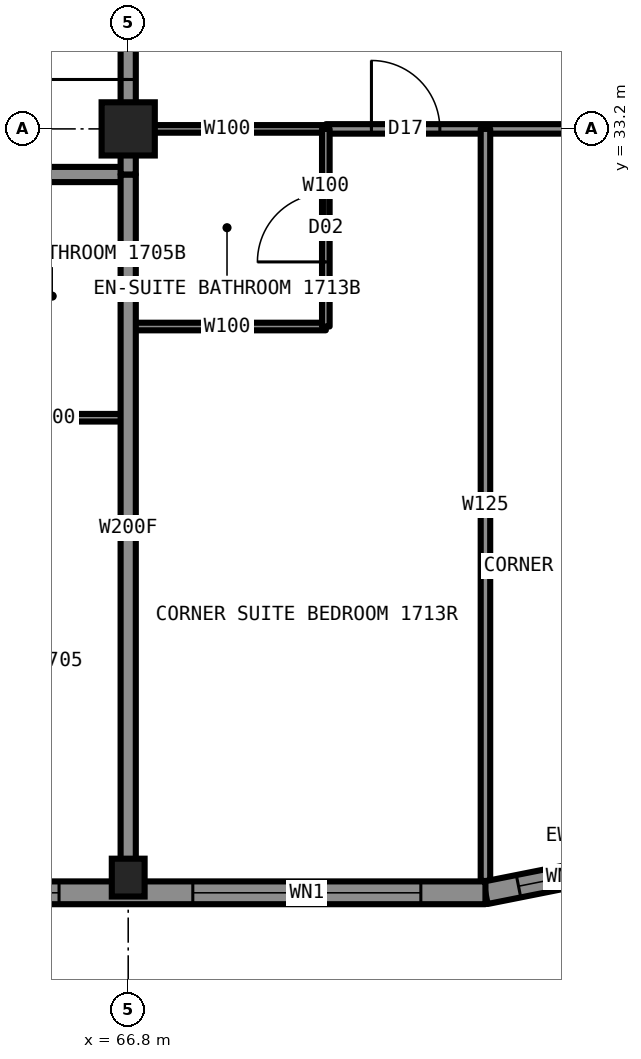
"""IFC4 building model, lengths in metres.
Left out: names, types, materials, properties, quantities, classifications, styles, units other than length and angle.
Written with IfcOpenShell. Run it as: python <this file> out.ifc"""

import sys

from ifc_helpers import new_model, si_unit, direction, frame, frame_2d, origin, origin_2d, place, context, subcontext, project, spatial, rectangle, hollow_rectangle, i_section, extrude, element, fill, save


model = new_model("IFC4")
c1 = context("Model", 3, precision=1e-05, world=origin(), true_north=direction((0.0, 1.0)))
c2 = subcontext(c1, "Body", "Model", "MODEL_VIEW")
j1 = project(units=[si_unit("LENGTHUNIT", "METRE"), si_unit("PLANEANGLEUNIT", "RADIAN")], contexts=[c1])
p1 = place(None, origin())
s1 = spatial("IfcSite", under=j1, at=p1, CompositionType="ELEMENT")
p2 = place(p1, origin())
s2 = spatial("IfcBuilding", under=s1, at=p2, CompositionType="ELEMENT")
p3 = place(p2, frame((0.0, 0.0, 60.0)))
s3 = spatial("IfcBuildingStorey", under=s2, at=p3, CompositionType="ELEMENT", Elevation=60.0)
p4 = place(p3, frame((66.8, 23.35, 0.0), z_axis=(0.0, 0.0, 1.0), x_axis=(1.0, 0.0, 0.0)))
e1 = element("IfcColumn", 1, at=p4, inside=s3, PredefinedType="COLUMN", context=c2, shape_type="SweptSolid", body=[
    extrude(i_section(OverallWidth=0.432, OverallDepth=0.498, WebThickness=0.056, FlangeThickness=0.089, at=origin_2d()), origin(), (0.0, 0.0, 1.0), 3.5),
])
p5 = place(p3, frame((66.8, 33.2, 0.0), z_axis=(0.0, 0.0, 1.0), x_axis=(1.0, 0.0, 0.0)))
e2 = element("IfcColumn", 2, at=p5, inside=s3, PredefinedType="COLUMN", context=c2, shape_type="SweptSolid", body=[
    extrude(hollow_rectangle(XDim=0.7, YDim=0.7, WallThickness=0.06, at=origin_2d()), origin(), (0.0, 0.0, 1.0), 3.5),
])
p6 = place(p3, frame((66.8, 33.2, 0.0), z_axis=(0.0, 0.0, 1.0), x_axis=(1.0, 0.0, 0.0)))
e3 = element("IfcWall", 3, at=p6, inside=s3, PredefinedType="PARTITIONING", context=c2, shape_type="SweptSolid", body=[
    extrude(rectangle(XDim=2.6, YDim=0.1, at=frame_2d((1.3, 0.0))), origin(), (0.0, 0.0, 1.0), 2.573),
])
p7 = place(p3, frame((69.4, 33.2, 0.0), z_axis=(0.0, 0.0, 1.0), x_axis=(1.0, 0.0, 0.0)))
e4 = element("IfcWall", 4, at=p7, inside=s3, PredefinedType="PARTITIONING", context=c2, shape_type="SweptSolid", body=[
    extrude(rectangle(XDim=7.3, YDim=0.125, at=frame_2d((3.65, 0.0))), origin(), (0.0, 0.0, 1.0), 2.573),
])
p8 = place(p7, frame((0.6, 0.0, 0.0)))
e5 = element("IfcOpeningElement", 5, at=p8, cuts=e4, PredefinedType="OPENING", context=c2, shape_type="SweptSolid", body=[
    extrude(rectangle(XDim=0.9, YDim=2.2, at=frame_2d((0.45, 1.1))), frame((0.0, 0.073, 0.0), z_axis=(0.0, -1.0, 0.0), x_axis=(1.0, 0.0, 0.0)), (0.0, 0.0, 1.0), 0.145),
])
p9 = place(p7, frame((4.4, 0.0, 0.0)))
e6 = element("IfcOpeningElement", 6, at=p9, cuts=e4, PredefinedType="OPENING", context=c2, shape_type="SweptSolid", body=[
    extrude(rectangle(XDim=0.9, YDim=2.2, at=frame_2d((0.45, 1.1))), frame((0.0, 0.073, 0.0), z_axis=(0.0, -1.0, 0.0), x_axis=(1.0, 0.0, 0.0)), (0.0, 0.0, 1.0), 0.145),
])
p10 = place(p3, frame((43.2, 32.6, 0.0), z_axis=(0.0, 0.0, 1.0), x_axis=(1.0, 0.0, 0.0)))
e7 = element("IfcWall", 7, at=p10, inside=s3, PredefinedType="PARTITIONING", context=c2, shape_type="SweptSolid", body=[
    extrude(rectangle(XDim=23.6, YDim=0.2, at=frame_2d((11.8, 0.0))), origin(), (0.0, 0.0, 1.0), 3.33),
])
p11 = place(p10, frame((3.0, 0.0, 0.0)))
e8 = element("IfcOpeningElement", 8, at=p11, cuts=e7, PredefinedType="OPENING", context=c2, shape_type="SweptSolid", body=[
    extrude(rectangle(XDim=1.0, YDim=2.2, at=frame_2d((0.5, 1.1))), frame((0.0, 0.11, 0.0), z_axis=(0.0, -1.0, 0.0), x_axis=(1.0, 0.0, 0.0)), (0.0, 0.0, 1.0), 0.22),
])
p12 = place(p10, frame((12.44, 0.0, 0.0)))
e9 = element("IfcOpeningElement", 9, at=p12, cuts=e7, PredefinedType="OPENING", context=c2, shape_type="SweptSolid", body=[
    extrude(rectangle(XDim=1.0, YDim=2.2, at=frame_2d((0.5, 1.1))), frame((0.0, 0.11, 0.0), z_axis=(0.0, -1.0, 0.0), x_axis=(1.0, 0.0, 0.0)), (0.0, 0.0, 1.0), 0.22),
])
p13 = place(p10, frame((20.34, 0.0, 0.0)))
e10 = element("IfcOpeningElement", 10, at=p13, cuts=e7, PredefinedType="OPENING", context=c2, shape_type="SweptSolid", body=[
    extrude(rectangle(XDim=1.0, YDim=2.2, at=frame_2d((0.5, 1.1))), frame((0.0, 0.11, 0.0), z_axis=(0.0, -1.0, 0.0), x_axis=(1.0, 0.0, 0.0)), (0.0, 0.0, 1.0), 0.22),
])
p14 = place(p3, frame((66.8, 30.6, 0.0), z_axis=(0.0, 0.0, 1.0), x_axis=(1.0, 0.0, 0.0)))
e11 = element("IfcWall", 11, at=p14, inside=s3, PredefinedType="PARTITIONING", context=c2, shape_type="SweptSolid", body=[
    extrude(rectangle(XDim=2.6, YDim=0.1, at=frame_2d((1.3, 0.0))), origin(), (0.0, 0.0, 1.0), 3.33),
])
p15 = place(p3, frame((64.8, 29.4, 0.0), z_axis=(0.0, 0.0, 1.0), x_axis=(1.0, 0.0, 0.0)))
e12 = element("IfcWall", 12, at=p15, inside=s3, PredefinedType="PARTITIONING", context=c2, shape_type="SweptSolid", body=[
    extrude(rectangle(XDim=2.0, YDim=0.1, at=frame_2d((1.0, 0.0))), origin(), (0.0, 0.0, 1.0), 3.33),
])
p16 = place(p3, frame((66.8, 33.22, 0.0), z_axis=(0.0, 0.0, 1.0), x_axis=(0.0, 1.0, 0.0)))
e13 = element("IfcWall", 13, at=p16, inside=s3, PredefinedType="PARTITIONING", context=c2, shape_type="SweptSolid", body=[
    extrude(rectangle(XDim=23.58, YDim=0.2, at=frame_2d((11.79, 0.0))), origin(), (0.0, 0.0, 1.0), 3.33),
])
p17 = place(p16, frame((7.7, 0.0, 0.0)))
e14 = element("IfcOpeningElement", 14, at=p17, cuts=e13, PredefinedType="OPENING", context=c2, shape_type="SweptSolid", body=[
    extrude(rectangle(XDim=1.0, YDim=2.2, at=frame_2d((0.5, 1.1))), frame((0.0, 0.11, 0.0), z_axis=(0.0, -1.0, 0.0), x_axis=(1.0, 0.0, 0.0)), (0.0, 0.0, 1.0), 0.22),
])
p18 = place(p16, frame((17.29, 0.0, 0.0)))
e15 = element("IfcOpeningElement", 15, at=p18, cuts=e13, PredefinedType="OPENING", context=c2, shape_type="SweptSolid", body=[
    extrude(rectangle(XDim=1.0, YDim=2.2, at=frame_2d((0.5, 1.1))), frame((0.0, 0.11, 0.0), z_axis=(0.0, -1.0, 0.0), x_axis=(1.0, 0.0, 0.0)), (0.0, 0.0, 1.0), 0.22),
])
p19 = place(p16, frame((21.83, 0.0, 0.0)))
e16 = element("IfcOpeningElement", 16, at=p19, cuts=e13, PredefinedType="OPENING", context=c2, shape_type="SweptSolid", body=[
    extrude(rectangle(XDim=1.1, YDim=2.2, at=frame_2d((0.55, 1.1))), frame((0.0, 0.11, 0.0), z_axis=(0.0, -1.0, 0.0), x_axis=(1.0, 0.0, 0.0)), (0.0, 0.0, 1.0), 0.22),
])
p20 = place(p16, frame((0.63, 0.0, 0.0)))
e17 = element("IfcOpeningElement", 17, at=p20, cuts=e13, PredefinedType="OPENING", context=c2, shape_type="SweptSolid", body=[
    extrude(rectangle(XDim=1.1, YDim=2.2, at=frame_2d((0.55, 1.1))), frame((0.0, 0.11, 0.0), z_axis=(0.0, -1.0, 0.0), x_axis=(1.0, 0.0, 0.0)), (0.0, 0.0, 1.0), 0.22),
])
p21 = place(p3, frame((66.8, 23.3, 0.0), z_axis=(0.0, 0.0, 1.0), x_axis=(0.0, 1.0, 0.0)))
e18 = element("IfcWall", 18, at=p21, inside=s3, PredefinedType="PARTITIONING", context=c2, shape_type="SweptSolid", body=[
    extrude(rectangle(XDim=9.3, YDim=0.2, at=frame_2d((4.65, 0.0))), origin(), (0.0, 0.0, 1.0), 2.573),
])
p22 = place(p3, frame((69.4, 30.6, 0.0), z_axis=(0.0, 0.0, 1.0), x_axis=(0.0, 1.0, 0.0)))
e19 = element("IfcWall", 19, at=p22, inside=s3, PredefinedType="PARTITIONING", context=c2, shape_type="SweptSolid", body=[
    extrude(rectangle(XDim=2.6, YDim=0.1, at=frame_2d((1.3, 0.0))), origin(), (0.0, 0.0, 1.0), 3.33),
])
p23 = place(p22, frame((0.85, 0.0, 0.0)))
e20 = element("IfcOpeningElement", 20, at=p23, cuts=e19, PredefinedType="OPENING", context=c2, shape_type="SweptSolid", body=[
    extrude(rectangle(XDim=0.9, YDim=2.1, at=frame_2d((0.45, 1.05))), frame((0.0, 0.06, 0.0), z_axis=(0.0, -1.0, 0.0), x_axis=(1.0, 0.0, 0.0)), (0.0, 0.0, 1.0), 0.12),
])
p24 = place(p3, frame((71.5, 23.306, 0.0), z_axis=(0.0, 0.0, 1.0), x_axis=(0.0, 1.0, 0.0)))
e21 = element("IfcWall", 21, at=p24, inside=s3, PredefinedType="PARTITIONING", context=c2, shape_type="SweptSolid", body=[
    extrude(rectangle(XDim=9.894, YDim=0.125, at=frame_2d((4.947, 0.0))), origin(), (0.0, 0.0, 1.0), 3.33),
])
p25 = place(p3, frame((71.5, 23.15, 0.0), z_axis=(0.0, 0.0, 1.0), x_axis=(0.980787050784, 0.195081421501, 0.0)))
e22 = element("IfcWall", 22, at=p25, inside=s3, PredefinedType="SOLIDWALL", context=c2, shape_type="SweptSolid", body=[
    extrude(rectangle(XDim=2.087, YDim=0.3, at=frame_2d((1.044, 0.0))), origin(), (0.0, 0.0, 1.0), 3.33),
])
p26 = place(p25, frame((0.444, 0.0, 0.5)))
e23 = element("IfcOpeningElement", 23, at=p26, cuts=e22, PredefinedType="OPENING", context=c2, shape_type="SweptSolid", body=[
    extrude(rectangle(XDim=1.2, YDim=2.0, at=frame_2d((0.6, 1.0))), frame((0.0, 0.16, 0.0), z_axis=(0.0, -1.0, 0.0), x_axis=(1.0, 0.0, 0.0)), (0.0, 0.0, 1.0), 0.32),
])
p27 = place(p3, frame((38.5, 23.15, 0.0), z_axis=(0.0, 0.0, 1.0), x_axis=(1.0, 0.0, 0.0)))
e24 = element("IfcWall", 24, at=p27, inside=s3, PredefinedType="SOLIDWALL", context=c2, shape_type="SweptSolid", body=[
    extrude(rectangle(XDim=33.0, YDim=0.3, at=frame_2d((16.5, 0.0))), origin(), (0.0, 0.0, 1.0), 2.83),
])
p28 = place(p27, frame((0.85, 0.0, 0.5)))
e25 = element("IfcOpeningElement", 25, at=p28, cuts=e24, PredefinedType="OPENING", context=c2, shape_type="SweptSolid", body=[
    extrude(rectangle(XDim=3.0, YDim=2.0, at=frame_2d((1.5, 1.0))), frame((0.0, 0.16, 0.0), z_axis=(0.0, -1.0, 0.0), x_axis=(1.0, 0.0, 0.0)), (0.0, 0.0, 1.0), 0.32),
])
p29 = place(p27, frame((5.56, 0.0, 0.5)))
e26 = element("IfcOpeningElement", 26, at=p29, cuts=e24, PredefinedType="OPENING", context=c2, shape_type="SweptSolid", body=[
    extrude(rectangle(XDim=3.0, YDim=2.0, at=frame_2d((1.5, 1.0))), frame((0.0, 0.16, 0.0), z_axis=(0.0, -1.0, 0.0), x_axis=(1.0, 0.0, 0.0)), (0.0, 0.0, 1.0), 0.32),
])
p30 = place(p27, frame((10.28, 0.0, 0.5)))
e27 = element("IfcOpeningElement", 27, at=p30, cuts=e24, PredefinedType="OPENING", context=c2, shape_type="SweptSolid", body=[
    extrude(rectangle(XDim=1.2, YDim=1.7, at=frame_2d((0.6, 0.85))), frame((0.0, 0.16, 0.0), z_axis=(0.0, -1.0, 0.0), x_axis=(1.0, 0.0, 0.0)), (0.0, 0.0, 1.0), 0.32),
])
p31 = place(p27, frame((15.0, 0.0, 0.5)))
e28 = element("IfcOpeningElement", 28, at=p31, cuts=e24, PredefinedType="OPENING", context=c2, shape_type="SweptSolid", body=[
    extrude(rectangle(XDim=3.0, YDim=2.0, at=frame_2d((1.5, 1.0))), frame((0.0, 0.16, 0.0), z_axis=(0.0, -1.0, 0.0), x_axis=(1.0, 0.0, 0.0)), (0.0, 0.0, 1.0), 0.32),
])
p32 = place(p27, frame((21.52, 0.0, 0.5)))
e29 = element("IfcOpeningElement", 29, at=p32, cuts=e24, PredefinedType="OPENING", context=c2, shape_type="SweptSolid", body=[
    extrude(rectangle(XDim=1.2, YDim=1.7, at=frame_2d((0.6, 0.85))), frame((0.0, 0.16, 0.0), z_axis=(0.0, -1.0, 0.0), x_axis=(1.0, 0.0, 0.0)), (0.0, 0.0, 1.0), 0.32),
])
p33 = place(p27, frame((24.44, 0.0, 0.5)))
e30 = element("IfcOpeningElement", 30, at=p33, cuts=e24, PredefinedType="OPENING", context=c2, shape_type="SweptSolid", body=[
    extrude(rectangle(XDim=3.0, YDim=2.0, at=frame_2d((1.5, 1.0))), frame((0.0, 0.16, 0.0), z_axis=(0.0, -1.0, 0.0), x_axis=(1.0, 0.0, 0.0)), (0.0, 0.0, 1.0), 0.32),
])
p34 = place(p27, frame((29.15, 0.0, 0.5)))
e31 = element("IfcOpeningElement", 31, at=p34, cuts=e24, PredefinedType="OPENING", context=c2, shape_type="SweptSolid", body=[
    extrude(rectangle(XDim=3.0, YDim=2.0, at=frame_2d((1.5, 1.0))), frame((0.0, 0.16, 0.0), z_axis=(0.0, -1.0, 0.0), x_axis=(1.0, 0.0, 0.0)), (0.0, 0.0, 1.0), 0.32),
])
p35 = place(p27, frame((11.48, 0.0, 0.5)))
e32 = element("IfcOpeningElement", 32, at=p35, cuts=e24, PredefinedType="OPENING", context=c2, shape_type="SweptSolid", body=[
    extrude(rectangle(XDim=0.6, YDim=0.8, at=frame_2d((0.3, 0.4))), frame((0.0, 0.16, 0.0), z_axis=(0.0, -1.0, 0.0), x_axis=(1.0, 0.0, 0.0)), (0.0, 0.0, 1.0), 0.32),
])
p36 = place(p27, frame((20.87, 0.0, 0.5)))
e33 = element("IfcOpeningElement", 33, at=p36, cuts=e24, PredefinedType="OPENING", context=c2, shape_type="SweptSolid", body=[
    extrude(rectangle(XDim=0.6, YDim=0.8, at=frame_2d((0.3, 0.4))), frame((0.0, 0.16, 0.0), z_axis=(0.0, -1.0, 0.0), x_axis=(1.0, 0.0, 0.0)), (0.0, 0.0, 1.0), 0.32),
])
p37 = place(p3, frame((66.8, 32.6, 0.0), z_axis=(0.0, 0.0, 1.0), x_axis=(0.0, 1.0, 0.0)))
e34 = element("IfcWall", 34, at=p37, inside=s3, PredefinedType="PARTITIONING", context=c2, shape_type="SweptSolid", body=[
    extrude(rectangle(XDim=0.62, YDim=0.2, at=frame_2d((0.31, 0.0))), origin(), (0.0, 0.0, 1.0), 2.573),
])
p38 = place(p20, origin())
e35 = element("IfcDoor", 35, at=p38, inside=s3, OperationType="SINGLE_SWING_LEFT", PredefinedType="DOOR", context=c2, shape_type="SweptSolid", body=[
    extrude(rectangle(XDim=1.1, YDim=2.2, at=frame_2d((0.55, 1.1))), frame((0.0, 0.025, 0.0), z_axis=(0.0, -1.0, 0.0), x_axis=(1.0, 0.0, 0.0)), (0.0, 0.0, 1.0), 0.05),
])
fill(e17, e35)
p39 = place(p23, origin())
e36 = element("IfcDoor", 36, at=p39, inside=s3, OperationType="SINGLE_SWING_RIGHT", PredefinedType="DOOR", context=c2, shape_type="SweptSolid", body=[
    extrude(rectangle(XDim=0.9, YDim=2.1, at=frame_2d((0.45, 1.05))), frame((0.0, 0.025, 0.0), z_axis=(0.0, -1.0, 0.0), x_axis=(1.0, 0.0, 0.0)), (0.0, 0.0, 1.0), 0.05),
])
fill(e20, e36)
p40 = place(p8, origin())
e37 = element("IfcDoor", 37, at=p40, inside=s3, OperationType="SINGLE_SWING_LEFT", PredefinedType="DOOR", context=c2, shape_type="SweptSolid", body=[
    extrude(rectangle(XDim=0.9, YDim=2.2, at=frame_2d((0.45, 1.1))), frame((0.0, 0.025, 0.0), z_axis=(0.0, -1.0, 0.0), x_axis=(1.0, 0.0, 0.0)), (0.0, 0.0, 1.0), 0.05),
])
fill(e5, e37)
p41 = place(p26, origin())
e38 = element("IfcWindow", 38, at=p41, inside=s3, PartitioningType="SINGLE_PANEL", PredefinedType="WINDOW", context=c2, shape_type="SweptSolid", body=[
    extrude(rectangle(XDim=1.2, YDim=2.0, at=frame_2d((0.6, 1.0))), frame((0.0, 0.03, 0.0), z_axis=(0.0, -1.0, 0.0), x_axis=(1.0, 0.0, 0.0)), (0.0, 0.0, 1.0), 0.06),
])
fill(e23, e38)
p42 = place(p33, origin())
e39 = element("IfcWindow", 39, at=p42, inside=s3, PartitioningType="SINGLE_PANEL", PredefinedType="WINDOW", context=c2, shape_type="SweptSolid", body=[
    extrude(rectangle(XDim=3.0, YDim=2.0, at=frame_2d((1.5, 1.0))), frame((0.0, 0.03, 0.0), z_axis=(0.0, -1.0, 0.0), x_axis=(1.0, 0.0, 0.0)), (0.0, 0.0, 1.0), 0.06),
])
fill(e30, e39)
p43 = place(p34, origin())
e40 = element("IfcWindow", 40, at=p43, inside=s3, PartitioningType="SINGLE_PANEL", PredefinedType="WINDOW", context=c2, shape_type="SweptSolid", body=[
    extrude(rectangle(XDim=3.0, YDim=2.0, at=frame_2d((1.5, 1.0))), frame((0.0, 0.03, 0.0), z_axis=(0.0, -1.0, 0.0), x_axis=(1.0, 0.0, 0.0)), (0.0, 0.0, 1.0), 0.06),
])
fill(e31, e40)
save(model, sys.argv[1])
